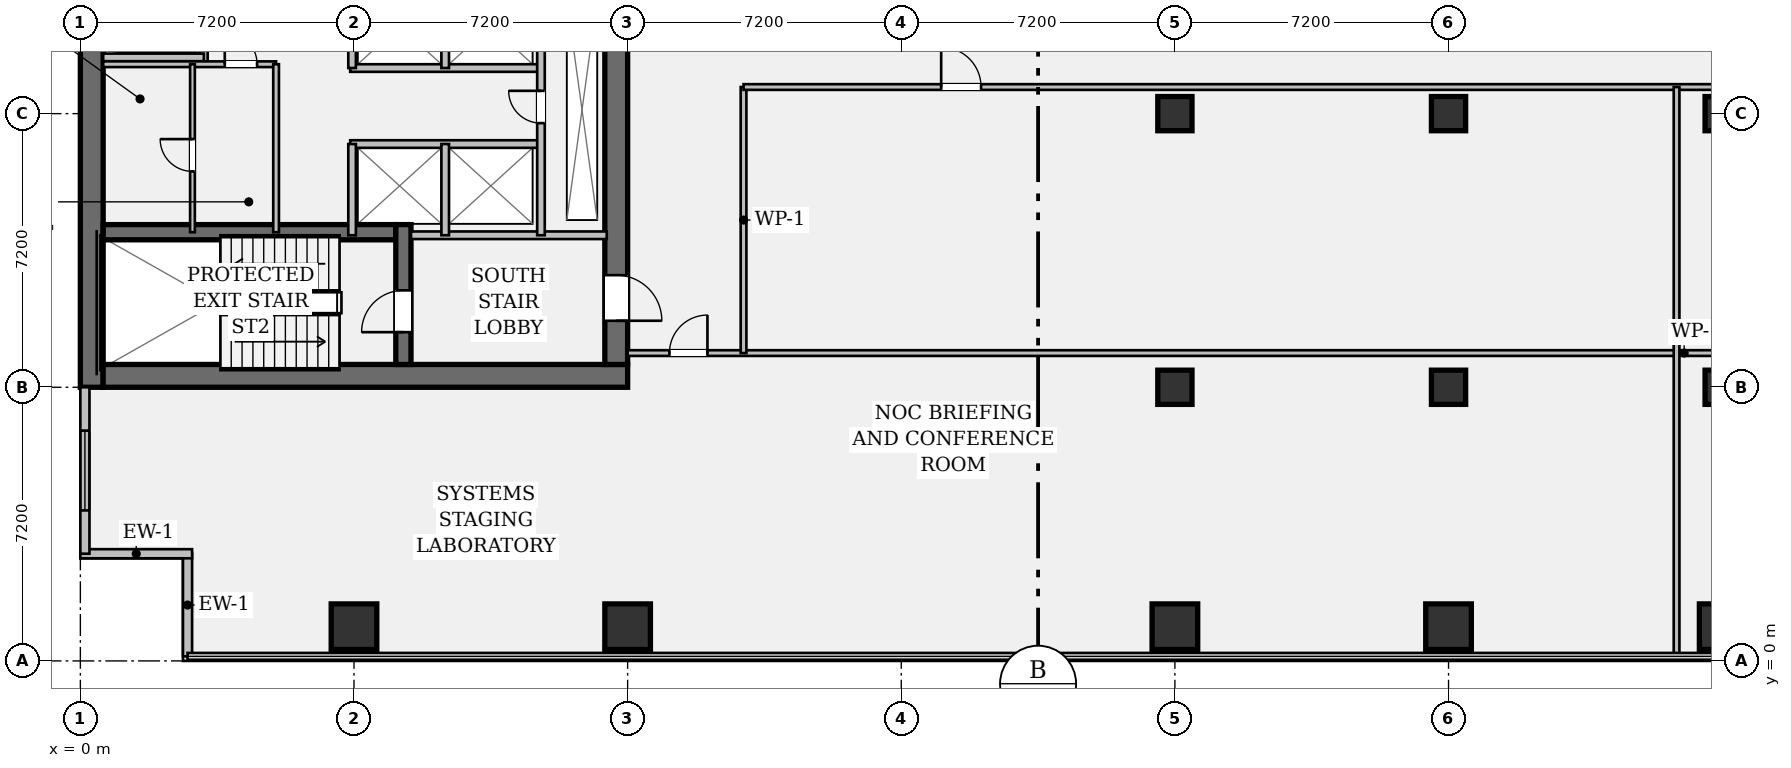
"""IFC4 building model, lengths in metres.
Left out: names, types, materials, properties, quantities, classifications, styles, units other than length and angle.
Written with IfcOpenShell. Run it as: python <this file> out.ifc"""

import sys

from ifc_helpers import new_model, si_unit, direction, frame, frame_2d, origin, origin_2d, place, context, subcontext, project, spatial, rectangle, hollow_rectangle, extrude, element, fill, save


model = new_model("IFC4")
c1 = context("Model", 3, precision=1e-05, world=origin(), true_north=direction((0.0, 1.0)))
c2 = subcontext(c1, "Body", "Model", "MODEL_VIEW")
j1 = project(units=[si_unit("LENGTHUNIT", "METRE"), si_unit("PLANEANGLEUNIT", "RADIAN")], contexts=[c1])
p1 = place(None, origin())
s1 = spatial("IfcSite", under=j1, at=p1, CompositionType="ELEMENT")
p2 = place(p1, origin())
s2 = spatial("IfcBuilding", under=s1, at=p2, CompositionType="ELEMENT")
p3 = place(p2, frame((0.0, 0.0, 13.65)))
s3 = spatial("IfcBuildingStorey", under=s2, at=p3, CompositionType="ELEMENT", Elevation=13.65)
p4 = place(p3, frame((0.3, 7.2, 0.0), z_axis=(0.0, 0.0, 1.0), x_axis=(0.0, 1.0, 0.0)))
e1 = element("IfcWall", 1, at=p4, inside=s3, PredefinedType="SHEAR", context=c2, shape_type="SweptSolid", body=[
    extrude(rectangle(XDim=28.8, YDim=0.6, at=frame_2d((14.4, 0.0))), origin(), (0.0, 0.0, 1.0), 3.91),
])
p5 = place(p3, frame((0.6, 7.5, 0.0), z_axis=(0.0, 0.0, 1.0), x_axis=(1.0, 0.0, 0.0)))
e2 = element("IfcWall", 2, at=p5, inside=s3, PredefinedType="SHEAR", context=c2, shape_type="SweptSolid", body=[
    extrude(rectangle(XDim=13.8, YDim=0.6, at=frame_2d((6.9, 0.0))), origin(), (0.0, 0.0, 1.0), 3.91),
])
p6 = place(p3, frame((14.1, 35.4, 0.0), z_axis=(0.0, 0.0, 1.0), x_axis=(0.0, -1.0, 0.0)))
e3 = element("IfcWall", 3, at=p6, inside=s3, PredefinedType="SHEAR", context=c2, shape_type="SweptSolid", body=[
    extrude(rectangle(XDim=27.6, YDim=0.6, at=frame_2d((13.8, 0.0))), origin(), (0.0, 0.0, 1.0), 3.91),
])
p7 = place(p6, frame((1.3, 0.0, 0.0)))
e4 = element("IfcOpeningElement", 4, at=p7, cuts=e3, PredefinedType="OPENING", context=c2, shape_type="SweptSolid", body=[
    extrude(rectangle(XDim=1.2, YDim=2.15, at=frame_2d((0.6, 1.075))), frame((0.0, 0.312, 0.0), z_axis=(0.0, -1.0, 0.0), x_axis=(1.0, 0.0, 0.0)), (0.0, 0.0, 1.0), 0.624),
])
p8 = place(p6, frame((25.25, 0.0, 0.0)))
e5 = element("IfcOpeningElement", 5, at=p8, cuts=e3, PredefinedType="OPENING", context=c2, shape_type="SweptSolid", body=[
    extrude(rectangle(XDim=1.2, YDim=2.15, at=frame_2d((0.6, 1.075))), frame((0.0, 0.312, 0.0), z_axis=(0.0, -1.0, 0.0), x_axis=(1.0, 0.0, 0.0)), (0.0, 0.0, 1.0), 0.624),
])
p9 = place(p6, frame((14.6, 0.0, 0.0)))
e6 = element("IfcOpeningElement", 6, at=p9, cuts=e3, PredefinedType="OPENING", context=c2, shape_type="SweptSolid", body=[
    extrude(rectangle(XDim=1.6, YDim=2.2, at=frame_2d((0.8, 1.1))), frame((0.0, 0.312, 0.0), z_axis=(0.0, -1.0, 0.0), x_axis=(1.0, 0.0, 0.0)), (0.0, 0.0, 1.0), 0.624),
])
p10 = place(p3, frame((0.6, 11.28, 0.0), z_axis=(0.0, 0.0, 1.0), x_axis=(1.0, 0.0, 0.0)))
e7 = element("IfcWall", 7, at=p10, inside=s3, PredefinedType="SHEAR", context=c2, shape_type="SweptSolid", body=[
    extrude(rectangle(XDim=7.7, YDim=0.4, at=frame_2d((3.85, 0.0))), origin(), (0.0, 0.0, 1.0), 3.91),
])
p11 = place(p3, frame((8.5, 7.8, 0.0), z_axis=(0.0, 0.0, 1.0), x_axis=(0.0, 1.0, 0.0)))
e8 = element("IfcWall", 8, at=p11, inside=s3, PredefinedType="SHEAR", context=c2, shape_type="SweptSolid", body=[
    extrude(rectangle(XDim=3.68, YDim=0.4, at=frame_2d((1.84, 0.0))), origin(), (0.0, 0.0, 1.0), 3.91),
])
p12 = place(p11, frame((0.85, 0.0, 0.0)))
e9 = element("IfcOpeningElement", 9, at=p12, cuts=e8, PredefinedType="OPENING", context=c2, shape_type="SweptSolid", body=[
    extrude(rectangle(XDim=1.1, YDim=2.15, at=frame_2d((0.55, 1.075))), frame((0.0, 0.212, 0.0), z_axis=(0.0, -1.0, 0.0), x_axis=(1.0, 0.0, 0.0)), (0.0, 0.0, 1.0), 0.424),
])
for number, where, z_axis, x_axis in (
    (10, (7.2, 0.9, 0.0), (0.0, 0.0, 1.0), (1.0, 0.0, 0.0)),
    (11, (14.4, 0.9, 0.0), (0.0, 0.0, 1.0), (1.0, 0.0, 0.0)),
    (12, (28.8, 0.9, 0.0), (0.0, 0.0, 1.0), (1.0, 0.0, 0.0)),
):
    element("IfcColumn", number, at=place(p3, frame(where, z_axis=z_axis, x_axis=x_axis)), inside=s3, PredefinedType="COLUMN", context=c2, shape_type="SweptSolid", body=[
        extrude(hollow_rectangle(XDim=1.2, YDim=1.2, WallThickness=0.075, at=origin_2d()), origin(), (0.0, 0.0, 1.0), 3.91),
    ])
for number, where, z_axis, x_axis in (
    (13, (28.8, 7.2, 0.0), (0.0, 0.0, 1.0), (1.0, 0.0, 0.0)),
    (14, (28.8, 14.4, 0.0), (0.0, 0.0, 1.0), (1.0, 0.0, 0.0)),
):
    element("IfcColumn", number, at=place(p3, frame(where, z_axis=z_axis, x_axis=x_axis)), inside=s3, PredefinedType="COLUMN", context=c2, shape_type="SweptSolid", body=[
        extrude(rectangle(XDim=0.9, YDim=0.9, at=origin_2d()), origin(), (0.0, 0.0, 1.0), 3.91),
    ])
p13 = place(p3, frame((36.0, 0.9, 0.0), z_axis=(0.0, 0.0, 1.0), x_axis=(1.0, 0.0, 0.0)))
e15 = element("IfcColumn", 15, at=p13, inside=s3, PredefinedType="COLUMN", context=c2, shape_type="SweptSolid", body=[
    extrude(hollow_rectangle(XDim=1.2, YDim=1.2, WallThickness=0.075, at=origin_2d()), origin(), (0.0, 0.0, 1.0), 3.91),
])
for number, where, z_axis, x_axis in (
    (16, (36.0, 7.2, 0.0), (0.0, 0.0, 1.0), (1.0, 0.0, 0.0)),
    (17, (36.0, 14.4, 0.0), (0.0, 0.0, 1.0), (1.0, 0.0, 0.0)),
):
    element("IfcColumn", number, at=place(p3, frame(where, z_axis=z_axis, x_axis=x_axis)), inside=s3, PredefinedType="COLUMN", context=c2, shape_type="SweptSolid", body=[
        extrude(rectangle(XDim=0.9, YDim=0.9, at=origin_2d()), origin(), (0.0, 0.0, 1.0), 3.91),
    ])
p14 = place(p3, frame((43.2, 0.9, 0.0), z_axis=(0.0, 0.0, 1.0), x_axis=(1.0, 0.0, 0.0)))
e18 = element("IfcColumn", 18, at=p14, inside=s3, PredefinedType="COLUMN", context=c2, shape_type="SweptSolid", body=[
    extrude(hollow_rectangle(XDim=1.2, YDim=1.2, WallThickness=0.075, at=origin_2d()), origin(), (0.0, 0.0, 1.0), 3.91),
])
for number, where, z_axis, x_axis in (
    (19, (43.2, 7.2, 0.0), (0.0, 0.0, 1.0), (1.0, 0.0, 0.0)),
    (20, (43.2, 14.4, 0.0), (0.0, 0.0, 1.0), (1.0, 0.0, 0.0)),
):
    element("IfcColumn", number, at=place(p3, frame(where, z_axis=z_axis, x_axis=x_axis)), inside=s3, PredefinedType="COLUMN", context=c2, shape_type="SweptSolid", body=[
        extrude(rectangle(XDim=0.9, YDim=0.9, at=origin_2d()), origin(), (0.0, 0.0, 1.0), 3.91),
    ])
p15 = place(p3, frame((2.82, 0.12, 0.0), z_axis=(0.0, 0.0, 1.0), x_axis=(0.0, 1.0, 0.0)))
e21 = element("IfcWall", 21, at=p15, inside=s3, PredefinedType="STANDARD", context=c2, shape_type="SweptSolid", body=[
    extrude(rectangle(XDim=2.7, YDim=0.24, at=frame_2d((1.35, 0.0))), origin(), (0.0, 0.0, 1.0), 3.91),
])
p16 = place(p3, frame((2.94, 2.82, 0.0), z_axis=(0.0, 0.0, 1.0), x_axis=(-1.0, 0.0, 0.0)))
e22 = element("IfcWall", 22, at=p16, inside=s3, PredefinedType="STANDARD", context=c2, shape_type="SweptSolid", body=[
    extrude(rectangle(XDim=2.94, YDim=0.24, at=frame_2d((1.47, 0.0))), origin(), (0.0, 0.0, 1.0), 3.91),
])
p17 = place(p3, frame((0.12, 2.82, 0.0), z_axis=(0.0, 0.0, 1.0), x_axis=(0.0, 1.0, 0.0)))
e23 = element("IfcWall", 23, at=p17, inside=s3, PredefinedType="STANDARD", context=c2, shape_type="SweptSolid", body=[
    extrude(rectangle(XDim=4.38, YDim=0.24, at=frame_2d((2.19, 0.0))), origin(), (0.0, 0.0, 1.0), 3.91),
])
p18 = place(p17, frame((1.14, 0.0, 0.95)))
e24 = element("IfcOpeningElement", 24, at=p18, cuts=e23, PredefinedType="OPENING", context=c2, shape_type="SweptSolid", body=[
    extrude(rectangle(XDim=2.1, YDim=1.8, at=frame_2d((1.05, 0.9))), frame((0.0, 0.132, 0.0), z_axis=(0.0, -1.0, 0.0), x_axis=(1.0, 0.0, 0.0)), (0.0, 0.0, 1.0), 0.264),
])
p19 = place(p3, frame((8.7, 11.2, 0.0), z_axis=(0.0, 0.0, 1.0), x_axis=(1.0, 0.0, 0.0)))
e25 = element("IfcWall", 25, at=p19, inside=s3, PredefinedType="PARTITIONING", context=c2, shape_type="SweptSolid", body=[
    extrude(rectangle(XDim=5.15, YDim=0.2, at=frame_2d((2.575, 0.0))), origin(), (0.0, 0.0, 1.0), 3.91),
])
p20 = place(p3, frame((3.25, 15.7, 0.0), z_axis=(0.0, 0.0, 1.0), x_axis=(0.0, 1.0, 0.0)))
e26 = element("IfcWall", 26, at=p20, inside=s3, PredefinedType="PARTITIONING", context=c2, shape_type="SweptSolid", body=[
    extrude(rectangle(XDim=13.08, YDim=0.2, at=frame_2d((6.54, 0.0))), origin(), (0.0, 0.0, 1.0), 3.91),
])
p21 = place(p3, frame((0.6, 15.88, 0.0), z_axis=(0.0, 0.0, 1.0), x_axis=(1.0, 0.0, 0.0)))
e27 = element("IfcWall", 27, at=p21, inside=s3, PredefinedType="PARTITIONING", context=c2, shape_type="SweptSolid", body=[
    extrude(rectangle(XDim=2.65, YDim=0.2, at=frame_2d((1.325, 0.0))), origin(), (0.0, 0.0, 1.0), 3.91),
])
for number, where, z_axis, x_axis in (
    (28, (7.1, 15.6, 0.0), (0.0, 0.0, 1.0), (1.0, 0.0, 0.0)),
    (29, (7.1, 13.6, 0.0), (0.0, 0.0, 1.0), (1.0, 0.0, 0.0)),
):
    element("IfcWall", number, at=place(p3, frame(where, z_axis=z_axis, x_axis=x_axis)), inside=s3, PredefinedType="PARTITIONING", context=c2, shape_type="SweptSolid", body=[
        extrude(rectangle(XDim=5.02, YDim=0.2, at=frame_2d((2.51, 0.0))), origin(), (0.0, 0.0, 1.0), 3.91),
    ])
p22 = place(p3, frame((7.15, 15.6, 0.0), z_axis=(0.0, 0.0, 1.0), x_axis=(0.0, 1.0, 0.0)))
e30 = element("IfcWall", 30, at=p22, inside=s3, PredefinedType="PARTITIONING", context=c2, shape_type="SweptSolid", body=[
    extrude(rectangle(XDim=2.2, YDim=0.2, at=frame_2d((1.1, 0.0))), origin(), (0.0, 0.0, 1.0), 3.91),
])
p23 = place(p3, frame((7.15, 11.2, 0.0), z_axis=(0.0, 0.0, 1.0), x_axis=(0.0, 1.0, 0.0)))
e31 = element("IfcWall", 31, at=p23, inside=s3, PredefinedType="PARTITIONING", context=c2, shape_type="SweptSolid", body=[
    extrude(rectangle(XDim=2.4, YDim=0.2, at=frame_2d((1.2, 0.0))), origin(), (0.0, 0.0, 1.0), 3.91),
])
p24 = place(p3, frame((9.6, 15.6, 0.0), z_axis=(0.0, 0.0, 1.0), x_axis=(0.0, 1.0, 0.0)))
e32 = element("IfcWall", 32, at=p24, inside=s3, PredefinedType="PARTITIONING", context=c2, shape_type="SweptSolid", body=[
    extrude(rectangle(XDim=2.2, YDim=0.2, at=frame_2d((1.1, 0.0))), origin(), (0.0, 0.0, 1.0), 3.91),
])
p25 = place(p3, frame((9.6, 11.2, 0.0), z_axis=(0.0, 0.0, 1.0), x_axis=(0.0, 1.0, 0.0)))
e33 = element("IfcWall", 33, at=p25, inside=s3, PredefinedType="PARTITIONING", context=c2, shape_type="SweptSolid", body=[
    extrude(rectangle(XDim=2.4, YDim=0.2, at=frame_2d((1.2, 0.0))), origin(), (0.0, 0.0, 1.0), 3.91),
])
p26 = place(p3, frame((12.12, 11.2, 0.0), z_axis=(0.0, 0.0, 1.0), x_axis=(0.0, 1.0, 0.0)))
e34 = element("IfcWall", 34, at=p26, inside=s3, PredefinedType="PARTITIONING", context=c2, shape_type="SweptSolid", body=[
    extrude(rectangle(XDim=6.6, YDim=0.2, at=frame_2d((3.3, 0.0))), origin(), (0.0, 0.0, 1.0), 3.91),
])
p27 = place(p26, frame((2.95, 0.0, 0.0)))
e35 = element("IfcOpeningElement", 35, at=p27, cuts=e34, PredefinedType="OPENING", context=c2, shape_type="SweptSolid", body=[
    extrude(rectangle(XDim=0.85, YDim=2.15, at=frame_2d((0.425, 1.075))), frame((0.0, 0.112, 0.0), z_axis=(0.0, -1.0, 0.0), x_axis=(1.0, 0.0, 0.0)), (0.0, 0.0, 1.0), 0.224),
])
p28 = place(p3, frame((0.6, 15.7, 0.0), z_axis=(0.0, 0.0, 1.0), x_axis=(1.0, 0.0, 0.0)))
e36 = element("IfcWall", 36, at=p28, inside=s3, PredefinedType="PARTITIONING", context=c2, shape_type="SweptSolid", body=[
    extrude(rectangle(XDim=4.55, YDim=0.15, at=frame_2d((2.275, 0.0))), origin(), (0.0, 0.0, 1.0), 3.91),
])
p29 = place(p28, frame((3.2, 0.0, 0.0)))
e37 = element("IfcOpeningElement", 37, at=p29, cuts=e36, PredefinedType="OPENING", context=c2, shape_type="SweptSolid", body=[
    extrude(rectangle(XDim=0.85, YDim=2.15, at=frame_2d((0.425, 1.075))), frame((0.0, 0.087, 0.0), z_axis=(0.0, -1.0, 0.0), x_axis=(1.0, 0.0, 0.0)), (0.0, 0.0, 1.0), 0.174),
])
p30 = place(p3, frame((5.15, 11.28, 0.0), z_axis=(0.0, 0.0, 1.0), x_axis=(0.0, 1.0, 0.0)))
e38 = element("IfcWall", 38, at=p30, inside=s3, PredefinedType="PARTITIONING", context=c2, shape_type="SweptSolid", body=[
    extrude(rectangle(XDim=4.42, YDim=0.15, at=frame_2d((2.21, 0.0))), origin(), (0.0, 0.0, 1.0), 3.91),
])
p31 = place(p3, frame((2.95, 11.28, 0.0), z_axis=(0.0, 0.0, 1.0), x_axis=(0.0, 1.0, 0.0)))
e39 = element("IfcWall", 39, at=p31, inside=s3, PredefinedType="PARTITIONING", context=c2, shape_type="SweptSolid", body=[
    extrude(rectangle(XDim=4.42, YDim=0.125, at=frame_2d((2.21, 0.0))), origin(), (0.0, 0.0, 1.0), 3.91),
])
p32 = place(p31, frame((1.6, 0.0, 0.0)))
e40 = element("IfcOpeningElement", 40, at=p32, cuts=e39, PredefinedType="OPENING", context=c2, shape_type="SweptSolid", body=[
    extrude(rectangle(XDim=0.85, YDim=2.15, at=frame_2d((0.425, 1.075))), frame((0.0, 0.074, 0.0), z_axis=(0.0, -1.0, 0.0), x_axis=(1.0, 0.0, 0.0)), (0.0, 0.0, 1.0), 0.149),
])
p33 = place(p3, frame((14.4, 8.1, 0.0), z_axis=(0.0, 0.0, 1.0), x_axis=(1.0, 0.0, 0.0)))
e41 = element("IfcWall", 41, at=p33, inside=s3, PredefinedType="PARTITIONING", context=c2, shape_type="SweptSolid", body=[
    extrude(rectangle(XDim=55.6, YDim=0.15, at=frame_2d((27.8, 0.0))), origin(), (0.0, 0.0, 1.0), 2.968),
])
p34 = place(p33, frame((1.1, 0.0, 0.0)))
e42 = element("IfcOpeningElement", 42, at=p34, cuts=e41, PredefinedType="OPENING", context=c2, shape_type="SweptSolid", body=[
    extrude(rectangle(XDim=1.0, YDim=2.15, at=frame_2d((0.5, 1.075))), frame((0.0, 0.087, 0.0), z_axis=(0.0, -1.0, 0.0), x_axis=(1.0, 0.0, 0.0)), (0.0, 0.0, 1.0), 0.174),
])
p35 = place(p3, frame((17.45, 8.1, 0.0), z_axis=(0.0, 0.0, 1.0), x_axis=(0.0, 1.0, 0.0)))
e43 = element("IfcWall", 43, at=p35, inside=s3, PredefinedType="PARTITIONING", context=c2, shape_type="SweptSolid", body=[
    extrude(rectangle(XDim=7.0, YDim=0.15, at=frame_2d((3.5, 0.0))), origin(), (0.0, 0.0, 1.0), 2.968),
])
p36 = place(p3, frame((17.45, 15.1, 0.0), z_axis=(0.0, 0.0, 1.0), x_axis=(1.0, 0.0, 0.0)))
e44 = element("IfcWall", 44, at=p36, inside=s3, PredefinedType="PARTITIONING", context=c2, shape_type="SweptSolid", body=[
    extrude(rectangle(XDim=52.55, YDim=0.15, at=frame_2d((26.275, 0.0))), origin(), (0.0, 0.0, 1.0), 2.968),
])
p37 = place(p36, frame((5.2, 0.0, 0.0)))
e45 = element("IfcOpeningElement", 45, at=p37, cuts=e44, PredefinedType="OPENING", context=c2, shape_type="SweptSolid", body=[
    extrude(rectangle(XDim=1.05, YDim=2.15, at=frame_2d((0.525, 1.075))), frame((0.0, 0.087, 0.0), z_axis=(0.0, -1.0, 0.0), x_axis=(1.0, 0.0, 0.0)), (0.0, 0.0, 1.0), 0.174),
])
p38 = place(p36, frame((27.6, 0.0, 0.0)))
e46 = element("IfcOpeningElement", 46, at=p38, cuts=e44, PredefinedType="OPENING", context=c2, shape_type="SweptSolid", body=[
    extrude(rectangle(XDim=1.05, YDim=2.15, at=frame_2d((0.525, 1.075))), frame((0.0, 0.087, 0.0), z_axis=(0.0, -1.0, 0.0), x_axis=(1.0, 0.0, 0.0)), (0.0, 0.0, 1.0), 0.174),
])
p39 = place(p3, frame((42.0, 0.12, 0.0), z_axis=(0.0, 0.0, 1.0), x_axis=(0.0, 1.0, 0.0)))
e47 = element("IfcWall", 47, at=p39, inside=s3, PredefinedType="PARTITIONING", context=c2, shape_type="SweptSolid", body=[
    extrude(rectangle(XDim=14.98, YDim=0.15, at=frame_2d((7.49, 0.0))), origin(), (0.0, 0.0, 1.0), 2.968),
])
p40 = place(p18, origin())
e48 = element("IfcWindow", 48, at=p40, inside=s3, PartitioningType="SINGLE_PANEL", PredefinedType="WINDOW", context=c2, shape_type="SweptSolid", body=[
    extrude(rectangle(XDim=2.1, YDim=1.8, at=frame_2d((1.05, 0.9))), frame((0.0, 0.03, 0.0), z_axis=(0.0, -1.0, 0.0), x_axis=(1.0, 0.0, 0.0)), (0.0, 0.0, 1.0), 0.06),
])
fill(e24, e48)
p41 = place(p12, origin())
e49 = element("IfcDoor", 49, at=p41, inside=s3, OperationType="SINGLE_SWING_LEFT", PredefinedType="DOOR", context=c2, shape_type="SweptSolid", body=[
    extrude(rectangle(XDim=1.1, YDim=2.15, at=frame_2d((0.55, 1.075))), frame((0.0, 0.025, 0.0), z_axis=(0.0, -1.0, 0.0), x_axis=(1.0, 0.0, 0.0)), (0.0, 0.0, 1.0), 0.05),
])
fill(e9, e49)
p42 = place(p8, origin())
e50 = element("IfcDoor", 50, at=p42, inside=s3, OperationType="SINGLE_SWING_RIGHT", PredefinedType="DOOR", context=c2, shape_type="SweptSolid", body=[
    extrude(rectangle(XDim=1.2, YDim=2.15, at=frame_2d((0.6, 1.075))), frame((0.0, 0.025, 0.0), z_axis=(0.0, -1.0, 0.0), x_axis=(1.0, 0.0, 0.0)), (0.0, 0.0, 1.0), 0.05),
])
fill(e5, e50)
p43 = place(p27, origin())
e51 = element("IfcDoor", 51, at=p43, inside=s3, OperationType="SINGLE_SWING_RIGHT", PredefinedType="DOOR", context=c2, shape_type="SweptSolid", body=[
    extrude(rectangle(XDim=0.85, YDim=2.15, at=frame_2d((0.425, 1.075))), frame((0.0, 0.025, 0.0), z_axis=(0.0, -1.0, 0.0), x_axis=(1.0, 0.0, 0.0)), (0.0, 0.0, 1.0), 0.05),
])
fill(e35, e51)
p44 = place(p29, origin())
e52 = element("IfcDoor", 52, at=p44, inside=s3, OperationType="SINGLE_SWING_LEFT", PredefinedType="DOOR", context=c2, shape_type="SweptSolid", body=[
    extrude(rectangle(XDim=0.85, YDim=2.15, at=frame_2d((0.425, 1.075))), frame((0.0, 0.025, 0.0), z_axis=(0.0, -1.0, 0.0), x_axis=(1.0, 0.0, 0.0)), (0.0, 0.0, 1.0), 0.05),
])
fill(e37, e52)
p45 = place(p32, origin())
e53 = element("IfcDoor", 53, at=p45, inside=s3, OperationType="SINGLE_SWING_RIGHT", PredefinedType="DOOR", context=c2, shape_type="SweptSolid", body=[
    extrude(rectangle(XDim=0.85, YDim=2.15, at=frame_2d((0.425, 1.075))), frame((0.0, 0.025, 0.0), z_axis=(0.0, -1.0, 0.0), x_axis=(1.0, 0.0, 0.0)), (0.0, 0.0, 1.0), 0.05),
])
fill(e40, e53)
p46 = place(p34, origin())
e54 = element("IfcDoor", 54, at=p46, inside=s3, OperationType="SINGLE_SWING_RIGHT", PredefinedType="DOOR", context=c2, shape_type="SweptSolid", body=[
    extrude(rectangle(XDim=1.0, YDim=2.15, at=frame_2d((0.5, 1.075))), frame((0.0, 0.025, 0.0), z_axis=(0.0, -1.0, 0.0), x_axis=(1.0, 0.0, 0.0)), (0.0, 0.0, 1.0), 0.05),
])
fill(e42, e54)
p47 = place(p37, origin())
e55 = element("IfcDoor", 55, at=p47, inside=s3, OperationType="SINGLE_SWING_LEFT", PredefinedType="DOOR", context=c2, shape_type="SweptSolid", body=[
    extrude(rectangle(XDim=1.05, YDim=2.15, at=frame_2d((0.525, 1.075))), frame((0.0, 0.025, 0.0), z_axis=(0.0, -1.0, 0.0), x_axis=(1.0, 0.0, 0.0)), (0.0, 0.0, 1.0), 0.05),
])
fill(e45, e55)
save(model, sys.argv[1])
